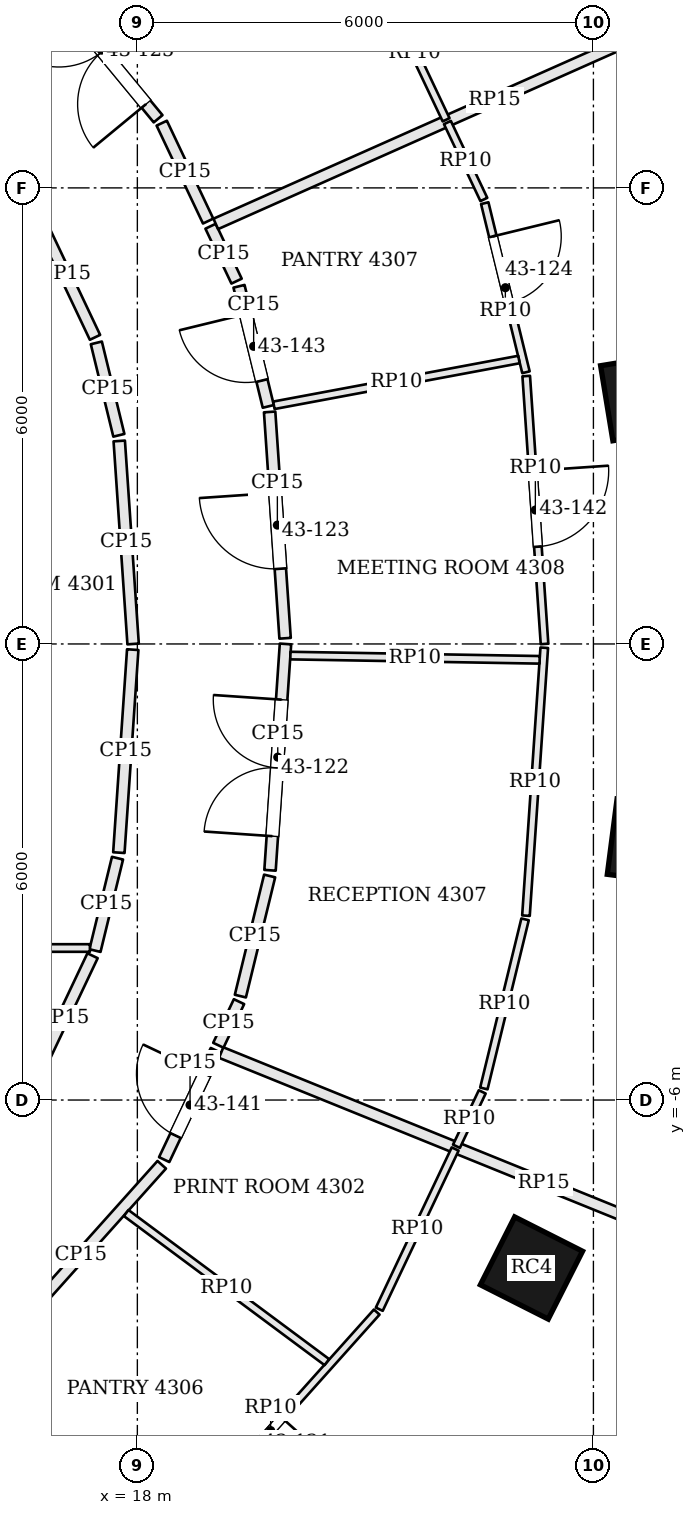
"""IFC4 building model, lengths in metres.
Left out: names, types, materials, properties, quantities, classifications, styles, units other than length and angle.
Written with IfcOpenShell. Run it as: python <this file> out.ifc"""

import sys

from ifc_helpers import new_model, si_unit, direction, frame, frame_2d, origin, origin_2d, place, context, subcontext, project, spatial, rectangle, extrude, element, fill, save


model = new_model("IFC4")
c1 = context("Model", 3, precision=1e-05, world=origin(), true_north=direction((0.0, 1.0)))
c2 = subcontext(c1, "Body", "Model", "MODEL_VIEW")
j1 = project(units=[si_unit("LENGTHUNIT", "METRE"), si_unit("PLANEANGLEUNIT", "RADIAN")], contexts=[c1])
p1 = place(None, origin())
s1 = spatial("IfcSite", under=j1, at=p1, CompositionType="ELEMENT")
p2 = place(p1, origin())
s2 = spatial("IfcBuilding", under=s1, at=p2, CompositionType="ELEMENT")
p3 = place(p2, frame((0.0, 0.0, 177.9)))
s3 = spatial("IfcBuildingStorey", under=s2, at=p3, CompositionType="ELEMENT", Elevation=177.9)
for number, where, z_axis, x_axis in (
    (1, (24.669, 3.248, 0.0), (0.0, 0.0, 1.0), (-0.162, 0.987, 0.0)),
    (2, (23.185, -8.21, 0.0), (0.0, 0.0, 1.0), (0.451, 0.893, 0.0)),
    (3, (24.743, -2.599, 0.0), (0.0, 0.0, 1.0), (0.128, 0.992, 0.0)),
):
    element("IfcColumn", number, at=place(p3, frame(where, z_axis=z_axis, x_axis=x_axis)), inside=s3, PredefinedType="COLUMN", context=c2, shape_type="SweptSolid", body=[
        extrude(rectangle(XDim=1.0, YDim=1.0, at=origin_2d()), origin(), (0.0, 0.0, 1.0), 3.9),
    ])
p4 = place(p3, frame((23.368, -11.701, 0.0), z_axis=(0.0, 0.0, 1.0), x_axis=(0.850251408633, 0.526376806211, 0.0)))
e4 = element("IfcWall", 4, at=p4, inside=s3, PredefinedType="SOLIDWALL", context=c2, shape_type="SweptSolid", body=[
    extrude(rectangle(XDim=5.302, YDim=0.45, at=frame_2d((2.651, 0.0))), origin(), (0.0, 0.0, 1.0), 3.7),
])
p5 = place(p4, frame((1.601, 0.0, 0.9)))
e5 = element("IfcOpeningElement", 5, at=p5, cuts=e4, PredefinedType="OPENING", context=c2, shape_type="SweptSolid", body=[
    extrude(rectangle(XDim=2.1, YDim=2.3, at=frame_2d((1.05, 1.15))), frame((0.0, 0.235, 0.0), z_axis=(0.0, -1.0, 0.0), x_axis=(1.0, 0.0, 0.0)), (0.0, 0.0, 1.0), 0.47),
])
p6 = place(p3, frame((16.193, -9.229, 0.0), z_axis=(0.0, 0.0, 1.0), x_axis=(0.666882089048, 0.745163256815, 0.0)))
e6 = element("IfcWall", 6, at=p6, inside=s3, PredefinedType="PARTITIONING", context=c2, shape_type="SweptSolid", body=[
    extrude(rectangle(XDim=3.19, YDim=0.15, at=frame_2d((1.595, 0.0))), origin(), (0.0, 0.0, 1.0), 3.084),
])
p7 = place(p3, frame((18.353, -6.784, 0.0), z_axis=(0.0, 0.0, 1.0), x_axis=(0.428125964575, 0.90371907054, 0.0)))
e7 = element("IfcWall", 7, at=p7, inside=s3, PredefinedType="PARTITIONING", context=c2, shape_type="SweptSolid", body=[
    extrude(rectangle(XDim=1.589, YDim=0.15, at=frame_2d((0.795, 0.0))), origin(), (0.0, 0.0, 1.0), 3.084),
])
p8 = place(p7, frame((0.35, 0.0, 0.0)))
e8 = element("IfcOpeningElement", 8, at=p8, cuts=e7, PredefinedType="OPENING", context=c2, shape_type="SweptSolid", body=[
    extrude(rectangle(XDim=0.9, YDim=2.1, at=frame_2d((0.45, 1.05))), frame((0.0, 0.085, 0.0), z_axis=(0.0, -1.0, 0.0), x_axis=(1.0, 0.0, 0.0)), (0.0, 0.0, 1.0), 0.17),
])
p9 = place(p3, frame((27.593, -8.816, 0.0), z_axis=(0.0, 0.0, 1.0), x_axis=(-0.9267854071, 0.375591279433, 0.0)))
e9 = element("IfcWall", 9, at=p9, inside=s3, PredefinedType="PARTITIONING", context=c2, shape_type="SweptSolid", body=[
    extrude(rectangle(XDim=9.161, YDim=0.15, at=frame_2d((4.58, 0.0))), origin(), (0.0, 0.0, 1.0), 3.234),
])
p10 = place(p3, frame((19.065, -5.28, 0.0), z_axis=(0.0, 0.0, 1.0), x_axis=(0.428202003813, 0.903683043954, 0.0)))
e10 = element("IfcWall", 10, at=p10, inside=s3, PredefinedType="PARTITIONING", context=c2, shape_type="SweptSolid", body=[
    extrude(rectangle(XDim=0.635, YDim=0.15, at=frame_2d((0.318, 0.0))), origin(), (0.0, 0.0, 1.0), 3.084),
])
p11 = place(p3, frame((19.355, -4.633, 0.0), z_axis=(0.0, 0.0, 1.0), x_axis=(0.236703930685, 0.971581828359, 0.0)))
e11 = element("IfcWall", 11, at=p11, inside=s3, PredefinedType="PARTITIONING", context=c2, shape_type="SweptSolid", body=[
    extrude(rectangle(XDim=1.626, YDim=0.15, at=frame_2d((0.813, 0.0))), origin(), (0.0, 0.0, 1.0), 3.084),
])
p12 = place(p3, frame((19.745, -2.978, 0.0), z_axis=(0.0, 0.0, 1.0), x_axis=(0.068142324, 0.997675610447, 0.0)))
e12 = element("IfcWall", 12, at=p12, inside=s3, PredefinedType="PARTITIONING", context=c2, shape_type="SweptSolid", body=[
    extrude(rectangle(XDim=2.984, YDim=0.15, at=frame_2d((1.492, 0.0))), origin(), (0.0, 0.0, 1.0), 3.084),
])
p13 = place(p12, frame((0.45, 0.0, 0.0)))
e13 = element("IfcOpeningElement", 13, at=p13, cuts=e12, PredefinedType="OPENING", context=c2, shape_type="SweptSolid", body=[
    extrude(rectangle(XDim=1.8, YDim=2.1, at=frame_2d((0.9, 1.05))), frame((0.0, 0.085, 0.0), z_axis=(0.0, -1.0, 0.0), x_axis=(1.0, 0.0, 0.0)), (0.0, 0.0, 1.0), 0.17),
])
p14 = place(p3, frame((19.944, 0.075, 0.0), z_axis=(0.0, 0.0, 1.0), x_axis=(-0.068136763128, 0.997675990245, 0.0)))
e14 = element("IfcWall", 14, at=p14, inside=s3, PredefinedType="PARTITIONING", context=c2, shape_type="SweptSolid", body=[
    extrude(rectangle(XDim=2.985, YDim=0.15, at=frame_2d((1.492, 0.0))), origin(), (0.0, 0.0, 1.0), 3.084),
])
p15 = place(p14, frame((0.917, 0.0, 0.0)))
e15 = element("IfcOpeningElement", 15, at=p15, cuts=e14, PredefinedType="OPENING", context=c2, shape_type="SweptSolid", body=[
    extrude(rectangle(XDim=1.0, YDim=2.4, at=frame_2d((0.5, 1.2))), frame((0.0, 0.085, 0.0), z_axis=(0.0, -1.0, 0.0), x_axis=(1.0, 0.0, 0.0)), (0.0, 0.0, 1.0), 0.17),
])
p16 = place(p3, frame((19.722, 3.125, 0.0), z_axis=(0.0, 0.0, 1.0), x_axis=(-0.236703930685, 0.971581828359, 0.0)))
e16 = element("IfcWall", 16, at=p16, inside=s3, PredefinedType="PARTITIONING", context=c2, shape_type="SweptSolid", body=[
    extrude(rectangle(XDim=1.626, YDim=0.15, at=frame_2d((0.813, 0.0))), origin(), (0.0, 0.0, 1.0), 3.084),
])
p17 = place(p16, frame((0.35, 0.0, 0.0)))
e17 = element("IfcOpeningElement", 17, at=p17, cuts=e16, PredefinedType="OPENING", context=c2, shape_type="SweptSolid", body=[
    extrude(rectangle(XDim=0.9, YDim=2.1, at=frame_2d((0.45, 1.05))), frame((0.0, 0.085, 0.0), z_axis=(0.0, -1.0, 0.0), x_axis=(1.0, 0.0, 0.0)), (0.0, 0.0, 1.0), 0.17),
])
p18 = place(p3, frame((19.305, 4.773, 0.0), z_axis=(0.0, 0.0, 1.0), x_axis=(-0.428296443676, 0.90363828844, 0.0)))
e18 = element("IfcWall", 18, at=p18, inside=s3, PredefinedType="PARTITIONING", context=c2, shape_type="SweptSolid", body=[
    extrude(rectangle(XDim=0.799, YDim=0.15, at=frame_2d((0.399, 0.0))), origin(), (0.0, 0.0, 1.0), 3.084),
])
p19 = place(p3, frame((26.367, 8.789, 0.0), z_axis=(0.0, 0.0, 1.0), x_axis=(-0.913673557468, -0.406448804137, 0.0)))
e19 = element("IfcWall", 19, at=p19, inside=s3, PredefinedType="PARTITIONING", context=c2, shape_type="SweptSolid", body=[
    extrude(rectangle(XDim=8.029, YDim=0.15, at=frame_2d((4.014, 0.0))), origin(), (0.0, 0.0, 1.0), 3.234),
])
p20 = place(p3, frame((18.931, 5.563, 0.0), z_axis=(0.0, 0.0, 1.0), x_axis=(-0.428204145682, 0.903682029046, 0.0)))
e20 = element("IfcWall", 20, at=p20, inside=s3, PredefinedType="PARTITIONING", context=c2, shape_type="SweptSolid", body=[
    extrude(rectangle(XDim=1.425, YDim=0.15, at=frame_2d((0.713, 0.0))), origin(), (0.0, 0.0, 1.0), 3.084),
])
p21 = place(p3, frame((18.273, 6.909, 0.0), z_axis=(0.0, 0.0, 1.0), x_axis=(-0.63653648943, 0.771246586783, 0.0)))
e21 = element("IfcWall", 21, at=p21, inside=s3, PredefinedType="PARTITIONING", context=c2, shape_type="SweptSolid", body=[
    extrude(rectangle(XDim=2.342, YDim=0.15, at=frame_2d((1.171, 0.0))), origin(), (0.0, 0.0, 1.0), 3.084),
])
p22 = place(p21, frame((0.25, 0.0, 0.0)))
e22 = element("IfcOpeningElement", 22, at=p22, cuts=e21, PredefinedType="OPENING", context=c2, shape_type="SweptSolid", body=[
    extrude(rectangle(XDim=1.8, YDim=2.1, at=frame_2d((0.9, 1.05))), frame((0.0, 0.085, 0.0), z_axis=(0.0, -1.0, 0.0), x_axis=(1.0, 0.0, 0.0)), (0.0, 0.0, 1.0), 0.17),
])
p23 = place(p3, frame((16.652, 5.702, 0.0), z_axis=(0.0, 0.0, 1.0), x_axis=(0.428126129773, -0.903718992279, 0.0)))
e23 = element("IfcWall", 23, at=p23, inside=s3, PredefinedType="PARTITIONING", context=c2, shape_type="SweptSolid", body=[
    extrude(rectangle(XDim=1.846, YDim=0.15, at=frame_2d((0.923, 0.0))), origin(), (0.0, 0.0, 1.0), 3.084),
])
p24 = place(p3, frame((17.46, 3.961, 0.0), z_axis=(0.0, 0.0, 1.0), x_axis=(0.236655249498, -0.971593687137, 0.0)))
e24 = element("IfcWall", 24, at=p24, inside=s3, PredefinedType="PARTITIONING", context=c2, shape_type="SweptSolid", body=[
    extrude(rectangle(XDim=1.251, YDim=0.15, at=frame_2d((0.626, 0.0))), origin(), (0.0, 0.0, 1.0), 3.084),
])
p25 = place(p3, frame((17.762, 2.67, 0.0), z_axis=(0.0, 0.0, 1.0), x_axis=(0.068135311644, -0.997676089373, 0.0)))
e25 = element("IfcWall", 25, at=p25, inside=s3, PredefinedType="PARTITIONING", context=c2, shape_type="SweptSolid", body=[
    extrude(rectangle(XDim=2.677, YDim=0.15, at=frame_2d((1.338, 0.0))), origin(), (0.0, 0.0, 1.0), 3.084),
])
p26 = place(p3, frame((17.939, -0.075, 0.0), z_axis=(0.0, 0.0, 1.0), x_axis=(-0.068226099283, -0.99766988497, 0.0)))
e26 = element("IfcWall", 26, at=p26, inside=s3, PredefinedType="PARTITIONING", context=c2, shape_type="SweptSolid", body=[
    extrude(rectangle(XDim=2.677, YDim=0.15, at=frame_2d((1.338, 0.0))), origin(), (0.0, 0.0, 1.0), 3.084),
])
p27 = place(p3, frame((17.739, -2.818, 0.0), z_axis=(0.0, 0.0, 1.0), x_axis=(-0.236884307907, -0.971537865792, 0.0)))
e27 = element("IfcWall", 27, at=p27, inside=s3, PredefinedType="PARTITIONING", context=c2, shape_type="SweptSolid", body=[
    extrude(rectangle(XDim=1.251, YDim=0.15, at=frame_2d((0.625, 0.0))), origin(), (0.0, 0.0, 1.0), 3.084),
])
p28 = place(p3, frame((17.41, -4.102, 0.0), z_axis=(0.0, 0.0, 1.0), x_axis=(-0.428074720318, -0.903743345107, 0.0)))
e28 = element("IfcWall", 28, at=p28, inside=s3, PredefinedType="PARTITIONING", context=c2, shape_type="SweptSolid", body=[
    extrude(rectangle(XDim=1.806, YDim=0.15, at=frame_2d((0.903, 0.0))), origin(), (0.0, 0.0, 1.0), 3.084),
])
p29 = place(p3, frame((22.181, -6.645, 0.0), z_axis=(0.0, 0.0, 1.0), x_axis=(-0.428144841987, -0.903710127353, 0.0)))
e29 = element("IfcWall", 29, at=p29, inside=s3, PredefinedType="PARTITIONING", context=c2, shape_type="SweptSolid", body=[
    extrude(rectangle(XDim=2.332, YDim=0.1, at=frame_2d((1.166, 0.0))), origin(), (0.0, 0.0, 1.0), 3.084),
])
p30 = place(p3, frame((21.149, -8.789, 0.0), z_axis=(0.0, 0.0, 1.0), x_axis=(-0.666915902537, -0.745132994132, 0.0)))
e30 = element("IfcWall", 30, at=p30, inside=s3, PredefinedType="PARTITIONING", context=c2, shape_type="SweptSolid", body=[
    extrude(rectangle(XDim=4.186, YDim=0.1, at=frame_2d((2.093, 0.0))), origin(), (0.0, 0.0, 1.0), 3.084),
])
p31 = place(p30, frame((1.869, 0.0, 0.0)))
e31 = element("IfcOpeningElement", 31, at=p31, cuts=e30, PredefinedType="OPENING", context=c2, shape_type="SweptSolid", body=[
    extrude(rectangle(XDim=0.9, YDim=2.1, at=frame_2d((0.45, 1.05))), frame((0.0, 0.06, 0.0), z_axis=(0.0, -1.0, 0.0), x_axis=(1.0, 0.0, 0.0)), (0.0, 0.0, 1.0), 0.12),
])
p32 = place(p3, frame((17.853, -7.487, 0.0), z_axis=(0.0, 0.0, 1.0), x_axis=(0.802681916891, -0.596407361034, 0.0)))
e32 = element("IfcWall", 32, at=p32, inside=s3, PredefinedType="PARTITIONING", context=c2, shape_type="SweptSolid", body=[
    extrude(rectangle(XDim=3.289, YDim=0.1, at=frame_2d((1.645, 0.0))), origin(), (0.0, 0.0, 1.0), 3.084),
])
p33 = place(p3, frame((22.079, 6.86, 0.0), z_axis=(0.0, 0.0, 1.0), x_axis=(0.428105084675, -0.903728961844, 0.0)))
e33 = element("IfcWall", 33, at=p33, inside=s3, PredefinedType="PARTITIONING", context=c2, shape_type="SweptSolid", body=[
    extrude(rectangle(XDim=1.12, YDim=0.1, at=frame_2d((0.56, 0.0))), origin(), (0.0, 0.0, 1.0), 3.084),
])
p34 = place(p3, frame((22.57, 5.799, 0.0), z_axis=(0.0, 0.0, 1.0), x_axis=(0.236811358433, -0.971555649727, 0.0)))
e34 = element("IfcWall", 34, at=p34, inside=s3, PredefinedType="PARTITIONING", context=c2, shape_type="SweptSolid", body=[
    extrude(rectangle(XDim=2.29, YDim=0.1, at=frame_2d((1.145, 0.0))), origin(), (0.0, 0.0, 1.0), 3.084),
])
p35 = place(p34, frame((0.45, 0.0, 0.0)))
e35 = element("IfcOpeningElement", 35, at=p35, cuts=e34, PredefinedType="OPENING", context=c2, shape_type="SweptSolid", body=[
    extrude(rectangle(XDim=0.9, YDim=2.1, at=frame_2d((0.45, 1.05))), frame((0.0, 0.06, 0.0), z_axis=(0.0, -1.0, 0.0), x_axis=(1.0, 0.0, 0.0)), (0.0, 0.0, 1.0), 0.12),
])
p36 = place(p3, frame((23.116, 3.525, 0.0), z_axis=(0.0, 0.0, 1.0), x_axis=(0.068138009452, -0.997675905125, 0.0)))
e36 = element("IfcWall", 36, at=p36, inside=s3, PredefinedType="PARTITIONING", context=c2, shape_type="SweptSolid", body=[
    extrude(rectangle(XDim=3.533, YDim=0.1, at=frame_2d((1.767, 0.0))), origin(), (0.0, 0.0, 1.0), 3.084),
])
p37 = place(p36, frame((1.25, 0.0, 0.0)))
e37 = element("IfcOpeningElement", 37, at=p37, cuts=e36, PredefinedType="OPENING", context=c2, shape_type="SweptSolid", body=[
    extrude(rectangle(XDim=1.0, YDim=2.4, at=frame_2d((0.5, 1.2))), frame((0.0, 0.06, 0.0), z_axis=(0.0, -1.0, 0.0), x_axis=(1.0, 0.0, 0.0)), (0.0, 0.0, 1.0), 0.12),
])
p38 = place(p3, frame((23.354, -0.05, 0.0), z_axis=(0.0, 0.0, 1.0), x_axis=(-0.06820679361, -0.99767120501, 0.0)))
e38 = element("IfcWall", 38, at=p38, inside=s3, PredefinedType="PARTITIONING", context=c2, shape_type="SweptSolid", body=[
    extrude(rectangle(XDim=3.533, YDim=0.1, at=frame_2d((1.767, 0.0))), origin(), (0.0, 0.0, 1.0), 3.084),
])
p39 = place(p3, frame((23.101, -3.623, 0.0), z_axis=(0.0, 0.0, 1.0), x_axis=(-0.236811358433, -0.971555649727, 0.0)))
e39 = element("IfcWall", 39, at=p39, inside=s3, PredefinedType="PARTITIONING", context=c2, shape_type="SweptSolid", body=[
    extrude(rectangle(XDim=2.29, YDim=0.1, at=frame_2d((1.145, 0.0))), origin(), (0.0, 0.0, 1.0), 3.084),
])
p40 = place(p3, frame((22.537, -5.893, 0.0), z_axis=(0.0, 0.0, 1.0), x_axis=(-0.427993557618, -0.903781784856, 0.0)))
e40 = element("IfcWall", 40, at=p40, inside=s3, PredefinedType="PARTITIONING", context=c2, shape_type="SweptSolid", body=[
    extrude(rectangle(XDim=0.792, YDim=0.1, at=frame_2d((0.396, 0.0))), origin(), (0.0, 0.0, 1.0), 3.084),
])
p41 = place(p3, frame((20.013, -0.153, 0.0), z_axis=(0.0, 0.0, 1.0), x_axis=(0.999854678593, -0.017047630214, 0.0)))
e41 = element("IfcWall", 41, at=p41, inside=s3, PredefinedType="PARTITIONING", context=c2, shape_type="SweptSolid", body=[
    extrude(rectangle(XDim=3.28, YDim=0.1, at=frame_2d((1.64, 0.0))), origin(), (0.0, 0.0, 1.0), 3.084),
])
p42 = place(p3, frame((19.796, 3.14, 0.0), z_axis=(0.0, 0.0, 1.0), x_axis=(0.983010938824, 0.183546980778, 0.0)))
e42 = element("IfcWall", 42, at=p42, inside=s3, PredefinedType="PARTITIONING", context=c2, shape_type="SweptSolid", body=[
    extrude(rectangle(XDim=3.28, YDim=0.1, at=frame_2d((1.64, 0.0))), origin(), (0.0, 0.0, 1.0), 3.084),
])
p43 = place(p3, frame((21.234, 8.644, 0.0), z_axis=(0.0, 0.0, 1.0), x_axis=(0.428183987328, -0.903691580682, 0.0)))
e43 = element("IfcWall", 43, at=p43, inside=s3, PredefinedType="PARTITIONING", context=c2, shape_type="SweptSolid", body=[
    extrude(rectangle(XDim=1.935, YDim=0.1, at=frame_2d((0.967, 0.0))), origin(), (0.0, 0.0, 1.0), 3.084),
])
p44 = place(p3, frame((15.075, -4.0, 0.0), z_axis=(0.0, 0.0, 1.0), x_axis=(1.0, 0.0, 0.0)))
e44 = element("IfcWall", 44, at=p44, inside=s3, PredefinedType="PARTITIONING", context=c2, shape_type="SweptSolid", body=[
    extrude(rectangle(XDim=2.301, YDim=0.1, at=frame_2d((1.15, 0.0))), origin(), (0.0, 0.0, 1.0), 3.084),
])
p45 = place(p31, origin())
e45 = element("IfcDoor", 45, at=p45, inside=s3, OperationType="SINGLE_SWING_LEFT", PredefinedType="DOOR", context=c2, shape_type="SweptSolid", body=[
    extrude(rectangle(XDim=0.9, YDim=2.1, at=frame_2d((0.45, 1.05))), frame((0.0, 0.025, 0.0), z_axis=(0.0, -1.0, 0.0), x_axis=(1.0, 0.0, 0.0)), (0.0, 0.0, 1.0), 0.05),
])
fill(e31, e45)
p46 = place(p13, origin())
e46 = element("IfcDoor", 46, at=p46, inside=s3, OperationType="DOUBLE_DOOR_SINGLE_SWING", PredefinedType="DOOR", context=c2, shape_type="SweptSolid", body=[
    extrude(rectangle(XDim=1.8, YDim=2.1, at=frame_2d((0.9, 1.05))), frame((0.0, 0.025, 0.0), z_axis=(0.0, -1.0, 0.0), x_axis=(1.0, 0.0, 0.0)), (0.0, 0.0, 1.0), 0.05),
])
fill(e13, e46)
p47 = place(p15, origin())
e47 = element("IfcDoor", 47, at=p47, inside=s3, OperationType="SINGLE_SWING_RIGHT", PredefinedType="DOOR", context=c2, shape_type="SweptSolid", body=[
    extrude(rectangle(XDim=1.0, YDim=2.4, at=frame_2d((0.5, 1.2))), frame((0.0, 0.025, 0.0), z_axis=(0.0, -1.0, 0.0), x_axis=(1.0, 0.0, 0.0)), (0.0, 0.0, 1.0), 0.05),
])
fill(e15, e47)
p48 = place(p35, origin())
e48 = element("IfcDoor", 48, at=p48, inside=s3, OperationType="SINGLE_SWING_LEFT", PredefinedType="DOOR", context=c2, shape_type="SweptSolid", body=[
    extrude(rectangle(XDim=0.9, YDim=2.1, at=frame_2d((0.45, 1.05))), frame((0.0, 0.025, 0.0), z_axis=(0.0, -1.0, 0.0), x_axis=(1.0, 0.0, 0.0)), (0.0, 0.0, 1.0), 0.05),
])
fill(e35, e48)
p49 = place(p22, origin())
e49 = element("IfcDoor", 49, at=p49, inside=s3, OperationType="DOUBLE_DOOR_SINGLE_SWING", PredefinedType="DOOR", context=c2, shape_type="SweptSolid", body=[
    extrude(rectangle(XDim=1.8, YDim=2.1, at=frame_2d((0.9, 1.05))), frame((0.0, 0.025, 0.0), z_axis=(0.0, -1.0, 0.0), x_axis=(1.0, 0.0, 0.0)), (0.0, 0.0, 1.0), 0.05),
])
fill(e22, e49)
p50 = place(p8, origin())
e50 = element("IfcDoor", 50, at=p50, inside=s3, OperationType="SINGLE_SWING_RIGHT", PredefinedType="DOOR", context=c2, shape_type="SweptSolid", body=[
    extrude(rectangle(XDim=0.9, YDim=2.1, at=frame_2d((0.45, 1.05))), frame((0.0, 0.025, 0.0), z_axis=(0.0, -1.0, 0.0), x_axis=(1.0, 0.0, 0.0)), (0.0, 0.0, 1.0), 0.05),
])
fill(e8, e50)
p51 = place(p37, origin())
e51 = element("IfcDoor", 51, at=p51, inside=s3, OperationType="SINGLE_SWING_LEFT", PredefinedType="DOOR", context=c2, shape_type="SweptSolid", body=[
    extrude(rectangle(XDim=1.0, YDim=2.4, at=frame_2d((0.5, 1.2))), frame((0.0, 0.025, 0.0), z_axis=(0.0, -1.0, 0.0), x_axis=(1.0, 0.0, 0.0)), (0.0, 0.0, 1.0), 0.05),
])
fill(e37, e51)
p52 = place(p17, origin())
e52 = element("IfcDoor", 52, at=p52, inside=s3, OperationType="SINGLE_SWING_RIGHT", PredefinedType="DOOR", context=c2, shape_type="SweptSolid", body=[
    extrude(rectangle(XDim=0.9, YDim=2.1, at=frame_2d((0.45, 1.05))), frame((0.0, 0.025, 0.0), z_axis=(0.0, -1.0, 0.0), x_axis=(1.0, 0.0, 0.0)), (0.0, 0.0, 1.0), 0.05),
])
fill(e17, e52)
save(model, sys.argv[1])
